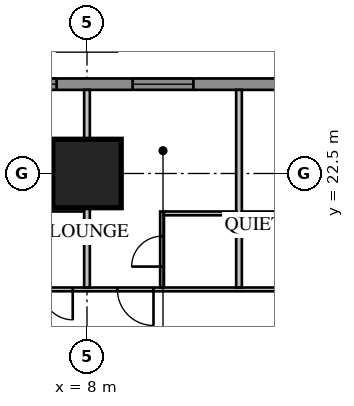
"""IFC4 building model, lengths in metres.
Left out: names, types, materials, properties, quantities, classifications, styles, units other than length and angle.
Written with IfcOpenShell. Run it as: python <this file> out.ifc"""

import sys

from ifc_helpers import new_model, si_unit, direction, frame, frame_2d, origin, origin_2d, place, context, subcontext, project, spatial, rectangle, extrude, element, fill, save


model = new_model("IFC4")
c1 = context("Model", 3, precision=1e-05, world=origin(), true_north=direction((0.0, 1.0)))
c2 = subcontext(c1, "Body", "Model", "MODEL_VIEW")
j1 = project(units=[si_unit("LENGTHUNIT", "METRE"), si_unit("PLANEANGLEUNIT", "RADIAN")], contexts=[c1])
p1 = place(None, origin())
s1 = spatial("IfcSite", under=j1, at=p1, CompositionType="ELEMENT")
p2 = place(p1, origin())
s2 = spatial("IfcBuilding", under=s1, at=p2, CompositionType="ELEMENT")
p3 = place(p2, frame((0.0, 0.0, 31.4)))
s3 = spatial("IfcBuildingStorey", under=s2, at=p3, CompositionType="ELEMENT", Elevation=31.4)
p4 = place(p3, frame((8.0, 22.5, 0.0), z_axis=(0.0, 0.0, 1.0), x_axis=(1.0, 0.0, 0.0)))
e1 = element("IfcColumn", 1, at=p4, inside=s3, PredefinedType="COLUMN", context=c2, shape_type="SweptSolid", body=[
    extrude(rectangle(XDim=1.8, YDim=1.8, at=origin_2d()), origin(), (0.0, 0.0, 1.0), 3.85),
])
p5 = place(p3, frame((16.0, 24.85, 0.0), z_axis=(0.0, 0.0, 1.0), x_axis=(-1.0, 0.0, 0.0)))
e2 = element("IfcWall", 2, at=p5, inside=s3, PredefinedType="SOLIDWALL", context=c2, shape_type="SweptSolid", body=[
    extrude(rectangle(XDim=32.0, YDim=0.3, at=frame_2d((16.0, 0.0))), origin(), (0.0, 0.0, 1.0), 3.65),
])
p6 = place(p5, frame((1.2, 0.0, 0.75)))
e3 = element("IfcOpeningElement", 3, at=p6, cuts=e2, PredefinedType="OPENING", context=c2, shape_type="SweptSolid", body=[
    extrude(rectangle(XDim=1.6, YDim=1.8, at=frame_2d((0.8, 0.9))), frame((0.0, 0.17, 0.0), z_axis=(0.0, -1.0, 0.0), x_axis=(1.0, 0.0, 0.0)), (0.0, 0.0, 1.0), 0.34),
])
p7 = place(p5, frame((5.2, 0.0, 0.75)))
e4 = element("IfcOpeningElement", 4, at=p7, cuts=e2, PredefinedType="OPENING", context=c2, shape_type="SweptSolid", body=[
    extrude(rectangle(XDim=1.6, YDim=1.8, at=frame_2d((0.8, 0.9))), frame((0.0, 0.17, 0.0), z_axis=(0.0, -1.0, 0.0), x_axis=(1.0, 0.0, 0.0)), (0.0, 0.0, 1.0), 0.34),
])
p8 = place(p5, frame((17.2, 0.0, 0.75)))
e5 = element("IfcOpeningElement", 5, at=p8, cuts=e2, PredefinedType="OPENING", context=c2, shape_type="SweptSolid", body=[
    extrude(rectangle(XDim=1.6, YDim=1.8, at=frame_2d((0.8, 0.9))), frame((0.0, 0.17, 0.0), z_axis=(0.0, -1.0, 0.0), x_axis=(1.0, 0.0, 0.0)), (0.0, 0.0, 1.0), 0.34),
])
p9 = place(p5, frame((21.2, 0.0, 0.75)))
e6 = element("IfcOpeningElement", 6, at=p9, cuts=e2, PredefinedType="OPENING", context=c2, shape_type="SweptSolid", body=[
    extrude(rectangle(XDim=1.6, YDim=1.8, at=frame_2d((0.8, 0.9))), frame((0.0, 0.17, 0.0), z_axis=(0.0, -1.0, 0.0), x_axis=(1.0, 0.0, 0.0)), (0.0, 0.0, 1.0), 0.34),
])
p10 = place(p5, frame((25.2, 0.0, 0.75)))
e7 = element("IfcOpeningElement", 7, at=p10, cuts=e2, PredefinedType="OPENING", context=c2, shape_type="SweptSolid", body=[
    extrude(rectangle(XDim=1.6, YDim=1.8, at=frame_2d((0.8, 0.9))), frame((0.0, 0.17, 0.0), z_axis=(0.0, -1.0, 0.0), x_axis=(1.0, 0.0, 0.0)), (0.0, 0.0, 1.0), 0.34),
])
p11 = place(p5, frame((29.2, 0.0, 0.75)))
e8 = element("IfcOpeningElement", 8, at=p11, cuts=e2, PredefinedType="OPENING", context=c2, shape_type="SweptSolid", body=[
    extrude(rectangle(XDim=1.6, YDim=1.8, at=frame_2d((0.8, 0.9))), frame((0.0, 0.17, 0.0), z_axis=(0.0, -1.0, 0.0), x_axis=(1.0, 0.0, 0.0)), (0.0, 0.0, 1.0), 0.34),
])
p12 = place(p5, frame((8.8, 0.0, 0.75)))
e9 = element("IfcOpeningElement", 9, at=p12, cuts=e2, PredefinedType="OPENING", context=c2, shape_type="SweptSolid", body=[
    extrude(rectangle(XDim=2.4, YDim=1.8, at=frame_2d((1.2, 0.9))), frame((0.0, 0.17, 0.0), z_axis=(0.0, -1.0, 0.0), x_axis=(1.0, 0.0, 0.0)), (0.0, 0.0, 1.0), 0.34),
])
p13 = place(p5, frame((13.812, 0.0, 0.0)))
e10 = element("IfcOpeningElement", 10, at=p13, cuts=e2, PredefinedType="OPENING", context=c2, shape_type="SweptSolid", body=[
    extrude(rectangle(XDim=1.0, YDim=2.4, at=frame_2d((0.5, 1.2))), frame((0.0, 0.17, 0.0), z_axis=(0.0, -1.0, 0.0), x_axis=(1.0, 0.0, 0.0)), (0.0, 0.0, 1.0), 0.34),
])
p14 = place(p3, frame((15.925, 19.45, 0.0), z_axis=(0.0, 0.0, 1.0), x_axis=(-1.0, 0.0, 0.0)))
e11 = element("IfcWall", 11, at=p14, inside=s3, PredefinedType="PARTITIONING", context=c2, shape_type="SweptSolid", body=[
    extrude(rectangle(XDim=31.85, YDim=0.1, at=frame_2d((15.925, 0.0))), origin(), (0.0, 0.0, 1.0), 3.65),
])
p15 = place(p14, frame((10.125, 0.0, 0.0)))
e12 = element("IfcOpeningElement", 12, at=p15, cuts=e11, PredefinedType="OPENING", context=c2, shape_type="SweptSolid", body=[
    extrude(rectangle(XDim=1.0, YDim=2.1, at=frame_2d((0.5, 1.05))), frame((0.0, 0.07, 0.0), z_axis=(0.0, -1.0, 0.0), x_axis=(1.0, 0.0, 0.0)), (0.0, 0.0, 1.0), 0.14),
])
p16 = place(p14, frame((8.3, 0.0, 0.0)))
e13 = element("IfcOpeningElement", 13, at=p16, cuts=e11, PredefinedType="OPENING", context=c2, shape_type="SweptSolid", body=[
    extrude(rectangle(XDim=0.8, YDim=2.1, at=frame_2d((0.4, 1.05))), frame((0.0, 0.07, 0.0), z_axis=(0.0, -1.0, 0.0), x_axis=(1.0, 0.0, 0.0)), (0.0, 0.0, 1.0), 0.14),
])
p17 = place(p14, frame((0.3, 0.0, 0.0)))
e14 = element("IfcOpeningElement", 14, at=p17, cuts=e11, PredefinedType="OPENING", context=c2, shape_type="SweptSolid", body=[
    extrude(rectangle(XDim=0.95, YDim=2.1, at=frame_2d((0.475, 1.05))), frame((0.0, 0.07, 0.0), z_axis=(0.0, -1.0, 0.0), x_axis=(1.0, 0.0, 0.0)), (0.0, 0.0, 1.0), 0.14),
])
p18 = place(p14, frame((6.175, 0.0, 0.0)))
e15 = element("IfcOpeningElement", 15, at=p18, cuts=e11, PredefinedType="OPENING", context=c2, shape_type="SweptSolid", body=[
    extrude(rectangle(XDim=0.95, YDim=2.1, at=frame_2d((0.475, 1.05))), frame((0.0, 0.07, 0.0), z_axis=(0.0, -1.0, 0.0), x_axis=(1.0, 0.0, 0.0)), (0.0, 0.0, 1.0), 0.14),
])
p19 = place(p14, frame((16.3, 0.0, 0.0)))
e16 = element("IfcOpeningElement", 16, at=p19, cuts=e11, PredefinedType="OPENING", context=c2, shape_type="SweptSolid", body=[
    extrude(rectangle(XDim=0.95, YDim=2.1, at=frame_2d((0.475, 1.05))), frame((0.0, 0.07, 0.0), z_axis=(0.0, -1.0, 0.0), x_axis=(1.0, 0.0, 0.0)), (0.0, 0.0, 1.0), 0.14),
])
p20 = place(p14, frame((22.175, 0.0, 0.0)))
e17 = element("IfcOpeningElement", 17, at=p20, cuts=e11, PredefinedType="OPENING", context=c2, shape_type="SweptSolid", body=[
    extrude(rectangle(XDim=0.95, YDim=2.1, at=frame_2d((0.475, 1.05))), frame((0.0, 0.07, 0.0), z_axis=(0.0, -1.0, 0.0), x_axis=(1.0, 0.0, 0.0)), (0.0, 0.0, 1.0), 0.14),
])
p21 = place(p14, frame((24.3, 0.0, 0.0)))
e18 = element("IfcOpeningElement", 18, at=p21, cuts=e11, PredefinedType="OPENING", context=c2, shape_type="SweptSolid", body=[
    extrude(rectangle(XDim=0.95, YDim=2.1, at=frame_2d((0.475, 1.05))), frame((0.0, 0.07, 0.0), z_axis=(0.0, -1.0, 0.0), x_axis=(1.0, 0.0, 0.0)), (0.0, 0.0, 1.0), 0.14),
])
p22 = place(p14, frame((30.175, 0.0, 0.0)))
e19 = element("IfcOpeningElement", 19, at=p22, cuts=e11, PredefinedType="OPENING", context=c2, shape_type="SweptSolid", body=[
    extrude(rectangle(XDim=0.95, YDim=2.1, at=frame_2d((0.475, 1.05))), frame((0.0, 0.07, 0.0), z_axis=(0.0, -1.0, 0.0), x_axis=(1.0, 0.0, 0.0)), (0.0, 0.0, 1.0), 0.14),
])
p23 = place(p3, frame((7.925, 21.55, 0.0), z_axis=(0.0, 0.0, 1.0), x_axis=(-1.0, 0.0, 0.0)))
e20 = element("IfcWall", 20, at=p23, inside=s3, PredefinedType="PARTITIONING", context=c2, shape_type="SweptSolid", body=[
    extrude(rectangle(XDim=1.7, YDim=0.1, at=frame_2d((0.85, 0.0))), origin(), (0.0, 0.0, 1.0), 3.65),
])
for number, where, z_axis, x_axis in (
    (21, (12.0, 19.5, 0.0), (0.0, 0.0, 1.0), (0.0, 1.0, 0.0)),
    (22, (8.0, 19.5, 0.0), (0.0, 0.0, 1.0), (0.0, 1.0, 0.0)),
):
    element("IfcWall", number, at=place(p3, frame(where, z_axis=z_axis, x_axis=x_axis)), inside=s3, PredefinedType="PARTITIONING", context=c2, shape_type="SweptSolid", body=[
        extrude(rectangle(XDim=5.2, YDim=0.15, at=frame_2d((2.6, 0.0))), origin(), (0.0, 0.0, 1.0), 3.65),
    ])
p24 = place(p3, frame((13.975, 21.45, 0.0), z_axis=(0.0, 0.0, 1.0), x_axis=(-1.0, 0.0, 0.0)))
e23 = element("IfcWall", 23, at=p24, inside=s3, PredefinedType="PARTITIONING", context=c2, shape_type="SweptSolid", body=[
    extrude(rectangle(XDim=1.9, YDim=0.1, at=frame_2d((0.95, 0.0))), origin(), (0.0, 0.0, 1.0), 3.65),
])
p25 = place(p3, frame((9.975, 19.5, 0.0), z_axis=(0.0, 0.0, 1.0), x_axis=(0.0, 1.0, 0.0)))
e24 = element("IfcWall", 24, at=p25, inside=s3, PredefinedType="PARTITIONING", context=c2, shape_type="SweptSolid", body=[
    extrude(rectangle(XDim=2.0, YDim=0.1, at=frame_2d((1.0, 0.0))), origin(), (0.0, 0.0, 1.0), 3.65),
])
p26 = place(p25, frame((0.55, 0.0, 0.0)))
e25 = element("IfcOpeningElement", 25, at=p26, cuts=e24, PredefinedType="OPENING", context=c2, shape_type="SweptSolid", body=[
    extrude(rectangle(XDim=0.8, YDim=2.1, at=frame_2d((0.4, 1.05))), frame((0.0, 0.07, 0.0), z_axis=(0.0, -1.0, 0.0), x_axis=(1.0, 0.0, 0.0)), (0.0, 0.0, 1.0), 0.14),
])
p27 = place(p3, frame((11.925, 21.45, 0.0), z_axis=(0.0, 0.0, 1.0), x_axis=(-1.0, 0.0, 0.0)))
e26 = element("IfcWall", 26, at=p27, inside=s3, PredefinedType="PARTITIONING", context=c2, shape_type="SweptSolid", body=[
    extrude(rectangle(XDim=1.9, YDim=0.1, at=frame_2d((0.95, 0.0))), origin(), (0.0, 0.0, 1.0), 3.65),
])
p28 = place(p7, origin())
e27 = element("IfcWindow", 27, at=p28, inside=s3, PartitioningType="SINGLE_PANEL", PredefinedType="WINDOW", context=c2, shape_type="SweptSolid", body=[
    extrude(rectangle(XDim=1.6, YDim=1.8, at=frame_2d((0.8, 0.9))), frame((0.0, 0.03, 0.0), z_axis=(0.0, -1.0, 0.0), x_axis=(1.0, 0.0, 0.0)), (0.0, 0.0, 1.0), 0.06),
])
fill(e4, e27)
p29 = place(p12, origin())
e28 = element("IfcWindow", 28, at=p29, inside=s3, PartitioningType="SINGLE_PANEL", PredefinedType="WINDOW", context=c2, shape_type="SweptSolid", body=[
    extrude(rectangle(XDim=2.4, YDim=1.8, at=frame_2d((1.2, 0.9))), frame((0.0, 0.03, 0.0), z_axis=(0.0, -1.0, 0.0), x_axis=(1.0, 0.0, 0.0)), (0.0, 0.0, 1.0), 0.06),
])
fill(e9, e28)
p30 = place(p16, origin())
e29 = element("IfcDoor", 29, at=p30, inside=s3, OperationType="SINGLE_SWING_LEFT", PredefinedType="DOOR", context=c2, shape_type="SweptSolid", body=[
    extrude(rectangle(XDim=0.8, YDim=2.1, at=frame_2d((0.4, 1.05))), frame((0.0, 0.025, 0.0), z_axis=(0.0, -1.0, 0.0), x_axis=(1.0, 0.0, 0.0)), (0.0, 0.0, 1.0), 0.05),
])
fill(e13, e29)
p31 = place(p18, origin())
e30 = element("IfcDoor", 30, at=p31, inside=s3, OperationType="SINGLE_SWING_LEFT", PredefinedType="DOOR", context=c2, shape_type="SweptSolid", body=[
    extrude(rectangle(XDim=0.95, YDim=2.1, at=frame_2d((0.475, 1.05))), frame((0.0, 0.025, 0.0), z_axis=(0.0, -1.0, 0.0), x_axis=(1.0, 0.0, 0.0)), (0.0, 0.0, 1.0), 0.05),
])
fill(e15, e30)
p32 = place(p26, origin())
e31 = element("IfcDoor", 31, at=p32, inside=s3, OperationType="SINGLE_SWING_LEFT", PredefinedType="DOOR", context=c2, shape_type="SweptSolid", body=[
    extrude(rectangle(XDim=0.8, YDim=2.1, at=frame_2d((0.4, 1.05))), frame((0.0, 0.025, 0.0), z_axis=(0.0, -1.0, 0.0), x_axis=(1.0, 0.0, 0.0)), (0.0, 0.0, 1.0), 0.05),
])
fill(e25, e31)
save(model, sys.argv[1])
